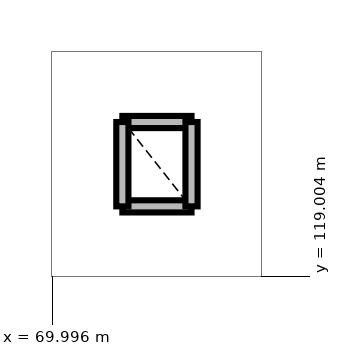
"""IFC4 building model, lengths in metres.
Left out: names, types, materials, properties, quantities, classifications, styles, units other than length and angle.
Written with IfcOpenShell. Run it as: python <this file> out.ifc"""

import sys

from ifc_helpers import new_model, si_unit, direction, frame, frame_2d, origin, place, context, subcontext, project, spatial, rectangle, extrude, element, save


model = new_model("IFC4")
c1 = context("Model", 3, precision=1e-05, world=origin(), true_north=direction((0.0, 1.0)))
c2 = subcontext(c1, "Body", "Model", "MODEL_VIEW")
j1 = project(units=[si_unit("LENGTHUNIT", "METRE"), si_unit("PLANEANGLEUNIT", "RADIAN")], contexts=[c1])
p1 = place(None, origin())
s1 = spatial("IfcSite", under=j1, at=p1, CompositionType="ELEMENT")
p2 = place(p1, origin())
s2 = spatial("IfcBuilding", under=s1, at=p2, CompositionType="ELEMENT")
p3 = place(p2, frame((0.0, 0.0, 17.7)))
s3 = spatial("IfcBuildingStorey", under=s2, at=p3, CompositionType="ELEMENT", Elevation=17.7)
for number, where, z_axis, x_axis in (
    (1, (70.92, 119.92, 0.0), (0.0, 0.0, 1.0), (1.0, 0.0, 0.0)),
    (2, (71.83, 121.03, 0.0), (0.0, 0.0, 1.0), (-1.0, 0.0, 0.0)),
):
    element("IfcWall", number, at=place(p3, frame(where, z_axis=z_axis, x_axis=x_axis)), inside=s3, PredefinedType="PARTITIONING", context=c2, shape_type="SweptSolid", body=[
        extrude(rectangle(XDim=0.91, YDim=0.16, at=frame_2d((0.455, 0.0))), origin(), (0.0, 0.0, 1.0), 3.65),
    ])
for number, where, z_axis, x_axis in (
    (3, (70.92, 121.03, 0.0), (0.0, 0.0, 1.0), (0.0, -1.0, 0.0)),
    (4, (71.83, 119.92, 0.0), (0.0, 0.0, 1.0), (0.0, 1.0, 0.0)),
):
    element("IfcWall", number, at=place(p3, frame(where, z_axis=z_axis, x_axis=x_axis)), inside=s3, PredefinedType="PARTITIONING", context=c2, shape_type="SweptSolid", body=[
        extrude(rectangle(XDim=1.11, YDim=0.16, at=frame_2d((0.555, 0.0))), origin(), (0.0, 0.0, 1.0), 3.65),
    ])
save(model, sys.argv[1])
